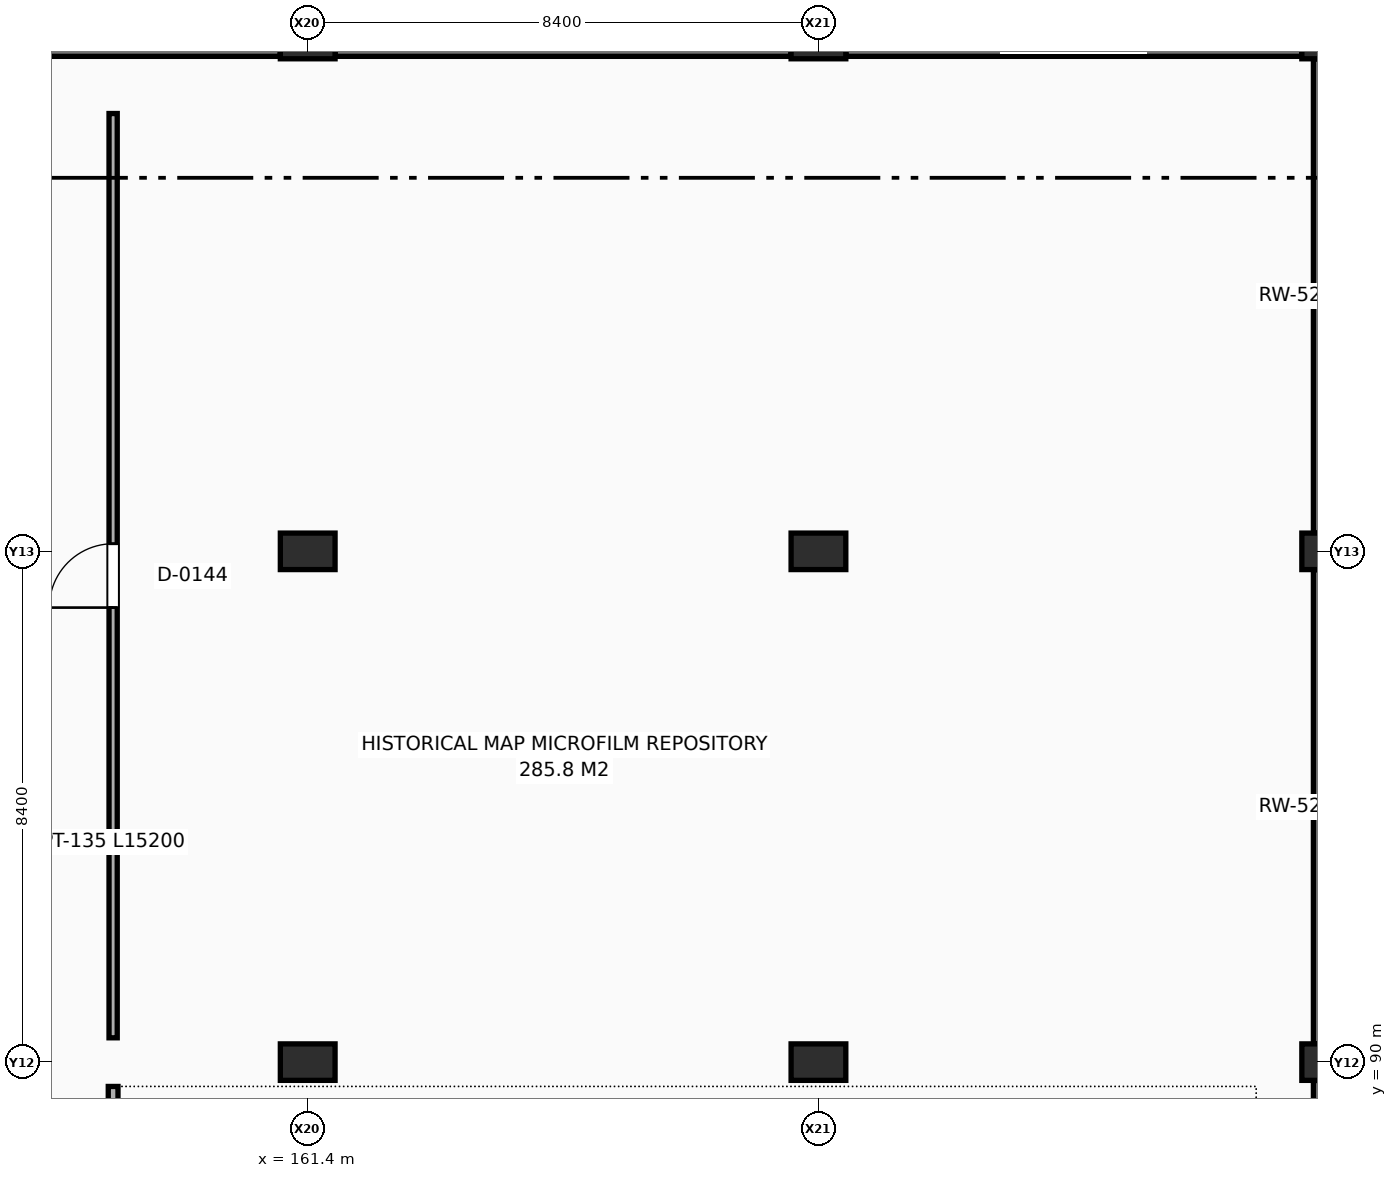
"""IFC4 building model, lengths in metres.
Left out: names, types, materials, properties, quantities, classifications, styles, units other than length and angle.
Written with IfcOpenShell. Run it as: python <this file> out.ifc"""

import sys

from ifc_helpers import new_model, si_unit, direction, frame, frame_2d, origin, origin_2d, place, context, subcontext, project, spatial, rectangle, extrude, element, fill, save


model = new_model("IFC4")
c1 = context("Model", 3, precision=1e-05, world=origin(), true_north=direction((0.0, 1.0)))
c2 = subcontext(c1, "Body", "Model", "MODEL_VIEW")
j1 = project(units=[si_unit("LENGTHUNIT", "METRE"), si_unit("PLANEANGLEUNIT", "RADIAN")], contexts=[c1])
p1 = place(None, origin())
s1 = spatial("IfcSite", under=j1, at=p1, CompositionType="ELEMENT")
p2 = place(p1, origin())
s2 = spatial("IfcBuilding", under=s1, at=p2, CompositionType="ELEMENT")
p3 = place(p2, frame((0.0, 0.0, -4.2)))
s3 = spatial("IfcBuildingStorey", under=s2, at=p3, CompositionType="ELEMENT", Elevation=-4.2)
for number, where, z_axis, x_axis in (
    (1, (161.4, 90.0, 0.0), (0.0, 0.0, 1.0), (1.0, 0.0, 0.0)),
    (2, (161.4, 98.4, 0.0), (0.0, 0.0, 1.0), (1.0, 0.0, 0.0)),
    (3, (161.4, 106.8, 0.0), (0.0, 0.0, 1.0), (1.0, 0.0, 0.0)),
    (4, (169.8, 90.0, 0.0), (0.0, 0.0, 1.0), (1.0, 0.0, 0.0)),
    (5, (169.8, 98.4, 0.0), (0.0, 0.0, 1.0), (1.0, 0.0, 0.0)),
    (6, (169.8, 106.8, 0.0), (0.0, 0.0, 1.0), (1.0, 0.0, 0.0)),
    (7, (178.2, 90.0, 0.0), (0.0, 0.0, 1.0), (1.0, 0.0, 0.0)),
    (8, (178.2, 98.4, 0.0), (0.0, 0.0, 1.0), (1.0, 0.0, 0.0)),
    (9, (178.2, 106.8, 0.0), (0.0, 0.0, 1.0), (1.0, 0.0, 0.0)),
):
    element("IfcColumn", number, at=place(p3, frame(where, z_axis=z_axis, x_axis=x_axis)), inside=s3, PredefinedType="COLUMN", context=c2, shape_type="SweptSolid", body=[
        extrude(rectangle(XDim=0.9, YDim=0.6, at=origin_2d()), origin(), (0.0, 0.0, 1.0), 4.2),
    ])
for number, where, z_axis, x_axis in (
    (10, (178.2, 81.902, 0.0), (0.0, 0.0, 1.0), (0.0, 1.0, 0.0)),
    (11, (178.2, 90.302, 0.0), (0.0, 0.0, 1.0), (0.0, 1.0, 0.0)),
):
    element("IfcWall", number, at=place(p3, frame(where, z_axis=z_axis, x_axis=x_axis)), inside=s3, PredefinedType="SOLIDWALL", context=c2, shape_type="SweptSolid", body=[
        extrude(rectangle(XDim=7.796, YDim=0.52, at=frame_2d((3.898, 0.0))), origin(), (0.0, 0.0, 1.0), 3.86),
    ])
p4 = place(p3, frame((178.2, 98.702, 0.0), z_axis=(0.0, 0.0, 1.0), x_axis=(0.0, 1.0, 0.0)))
e12 = element("IfcWall", 12, at=p4, inside=s3, PredefinedType="SOLIDWALL", context=c2, shape_type="SweptSolid", body=[
    extrude(rectangle(XDim=7.796, YDim=0.52, at=frame_2d((3.898, 0.0))), origin(), (0.0, 0.0, 1.0), 3.86),
])
p5 = place(p3, frame((177.748, 106.8, 0.0), z_axis=(0.0, 0.0, 1.0), x_axis=(-1.0, 0.0, 0.0)))
e13 = element("IfcWall", 13, at=p5, inside=s3, PredefinedType="SOLIDWALL", context=c2, shape_type="SweptSolid", body=[
    extrude(rectangle(XDim=7.496, YDim=0.52, at=frame_2d((3.748, 0.0))), origin(), (0.0, 0.0, 1.0), 3.86),
])
p6 = place(p3, frame((169.348, 106.8, 0.0), z_axis=(0.0, 0.0, 1.0), x_axis=(-1.0, 0.0, 0.0)))
e14 = element("IfcWall", 14, at=p6, inside=s3, PredefinedType="SOLIDWALL", context=c2, shape_type="SweptSolid", body=[
    extrude(rectangle(XDim=7.496, YDim=0.52, at=frame_2d((3.748, 0.0))), origin(), (0.0, 0.0, 1.0), 3.86),
])
p7 = place(p3, frame((160.948, 106.8, 0.0), z_axis=(0.0, 0.0, 1.0), x_axis=(-1.0, 0.0, 0.0)))
e15 = element("IfcWall", 15, at=p7, inside=s3, PredefinedType="SOLIDWALL", context=c2, shape_type="SweptSolid", body=[
    extrude(rectangle(XDim=7.496, YDim=0.52, at=frame_2d((3.748, 0.0))), origin(), (0.0, 0.0, 1.0), 3.86),
])
p8 = place(p3, frame((158.2, 73.6, 0.0), z_axis=(0.0, 0.0, 1.0), x_axis=(0.0, 1.0, 0.0)))
e16 = element("IfcWall", 16, at=p8, inside=s3, PredefinedType="PARTITIONING", context=c2, shape_type="SweptSolid", body=[
    extrude(rectangle(XDim=16.0, YDim=0.16, at=frame_2d((8.0, 0.0))), origin(), (0.0, 0.0, 1.0), 3.86),
])
p9 = place(p8, frame((7.45, 0.0, 0.0)))
e17 = element("IfcOpeningElement", 17, at=p9, cuts=e16, PredefinedType="OPENING", context=c2, shape_type="SweptSolid", body=[
    extrude(rectangle(XDim=1.1, YDim=2.15, at=frame_2d((0.55, 1.075))), frame((0.0, 0.09, 0.0), z_axis=(0.0, -1.0, 0.0), x_axis=(1.0, 0.0, 0.0)), (0.0, 0.0, 1.0), 0.18),
])
p10 = place(p3, frame((158.2, 90.4, 0.0), z_axis=(0.0, 0.0, 1.0), x_axis=(0.0, 1.0, 0.0)))
e18 = element("IfcWall", 18, at=p10, inside=s3, PredefinedType="PARTITIONING", context=c2, shape_type="SweptSolid", body=[
    extrude(rectangle(XDim=15.2, YDim=0.135, at=frame_2d((7.6, 0.0))), origin(), (0.0, 0.0, 1.0), 3.86),
])
p11 = place(p10, frame((7.075, 0.0, 0.0)))
e19 = element("IfcOpeningElement", 19, at=p11, cuts=e18, PredefinedType="OPENING", context=c2, shape_type="SweptSolid", body=[
    extrude(rectangle(XDim=1.05, YDim=2.15, at=frame_2d((0.525, 1.075))), frame((0.0, 0.077, 0.0), z_axis=(0.0, -1.0, 0.0), x_axis=(1.0, 0.0, 0.0)), (0.0, 0.0, 1.0), 0.155),
])
p12 = place(p11, origin())
e20 = element("IfcDoor", 20, at=p12, inside=s3, OperationType="SINGLE_SWING_LEFT", PredefinedType="DOOR", context=c2, shape_type="SweptSolid", body=[
    extrude(rectangle(XDim=1.05, YDim=2.15, at=frame_2d((0.525, 1.075))), frame((0.0, 0.025, 0.0), z_axis=(0.0, -1.0, 0.0), x_axis=(1.0, 0.0, 0.0)), (0.0, 0.0, 1.0), 0.05),
])
fill(e19, e20)
save(model, sys.argv[1])
